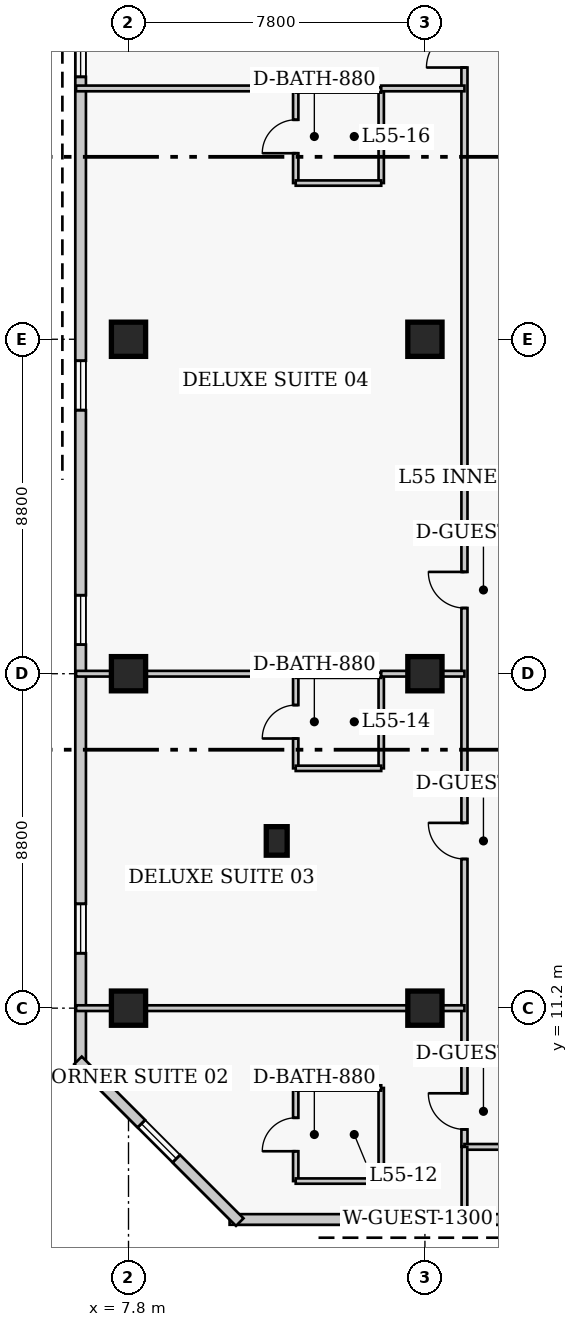
"""IFC4 building model, lengths in metres.
Left out: names, types, materials, properties, quantities, classifications, styles, units other than length and angle.
Written with IfcOpenShell. Run it as: python <this file> out.ifc"""

import sys

from ifc_helpers import new_model, si_unit, direction, frame, frame_2d, origin, origin_2d, place, context, subcontext, project, spatial, rectangle, extrude, element, fill, save


model = new_model("IFC4")
c1 = context("Model", 3, precision=1e-05, world=origin(), true_north=direction((0.0, 1.0)))
c2 = subcontext(c1, "Body", "Model", "MODEL_VIEW")
j1 = project(units=[si_unit("LENGTHUNIT", "METRE"), si_unit("PLANEANGLEUNIT", "RADIAN")], contexts=[c1])
p1 = place(None, origin())
s1 = spatial("IfcSite", under=j1, at=p1, CompositionType="ELEMENT")
p2 = place(p1, origin())
s2 = spatial("IfcBuilding", under=s1, at=p2, CompositionType="ELEMENT")
p3 = place(p2, frame((0.0, 0.0, 220.2)))
s3 = spatial("IfcBuildingStorey", under=s2, at=p3, CompositionType="ELEMENT", Elevation=220.2)
for number, where, z_axis, x_axis in (
    (1, (7.8, 11.2, 0.0), (0.0, 0.0, 1.0), (1.0, 0.0, 0.0)),
    (2, (7.8, 20.0, 0.0), (0.0, 0.0, 1.0), (1.0, 0.0, 0.0)),
    (3, (7.8, 28.8, 0.0), (0.0, 0.0, 1.0), (1.0, 0.0, 0.0)),
    (4, (15.6, 11.2, 0.0), (0.0, 0.0, 1.0), (1.0, 0.0, 0.0)),
    (5, (15.6, 20.0, 0.0), (0.0, 0.0, 1.0), (1.0, 0.0, 0.0)),
    (6, (15.6, 28.8, 0.0), (0.0, 0.0, 1.0), (1.0, 0.0, 0.0)),
):
    element("IfcColumn", number, at=place(p3, frame(where, z_axis=z_axis, x_axis=x_axis)), inside=s3, PredefinedType="COLUMN", context=c2, shape_type="SweptSolid", body=[
        extrude(rectangle(XDim=0.9, YDim=0.9, at=origin_2d()), origin(), (0.0, 0.0, 1.0), 3.9),
    ])
p4 = place(p3, frame((11.7, 15.6, 0.0), z_axis=(0.0, 0.0, 1.0), x_axis=(1.0, 0.0, 0.0)))
e7 = element("IfcColumn", 7, at=p4, inside=s3, PredefinedType="PILASTER", context=c2, shape_type="SweptSolid", body=[
    extrude(rectangle(XDim=0.55, YDim=0.75, at=origin_2d()), origin(), (0.0, 0.0, 1.0), 3.9),
])
p5 = place(p3, frame((10.46, 5.64, 0.0), z_axis=(0.0, 0.0, 1.0), x_axis=(1.0, 0.0, 0.0)))
e8 = element("IfcWall", 8, at=p5, inside=s3, PredefinedType="SOLIDWALL", context=c2, shape_type="SweptSolid", body=[
    extrude(rectangle(XDim=25.83, YDim=0.28, at=frame_2d((12.915, 0.0))), origin(), (0.0, 0.0, 1.0), 3.65),
])
p6 = place(p5, frame((4.305, 0.0, 0.85)))
e9 = element("IfcOpeningElement", 9, at=p6, cuts=e8, PredefinedType="OPENING", context=c2, shape_type="SweptSolid", body=[
    extrude(rectangle(XDim=1.3, YDim=1.7, at=frame_2d((0.65, 0.85))), frame((0.0, 0.15, 0.0), z_axis=(0.0, -1.0, 0.0), x_axis=(1.0, 0.0, 0.0)), (0.0, 0.0, 1.0), 0.3),
])
p7 = place(p5, frame((11.615, 0.0, 0.85)))
e10 = element("IfcOpeningElement", 10, at=p7, cuts=e8, PredefinedType="OPENING", context=c2, shape_type="SweptSolid", body=[
    extrude(rectangle(XDim=1.3, YDim=1.7, at=frame_2d((0.65, 0.85))), frame((0.0, 0.15, 0.0), z_axis=(0.0, -1.0, 0.0), x_axis=(1.0, 0.0, 0.0)), (0.0, 0.0, 1.0), 0.3),
])
p8 = place(p5, frame((20.875, 0.0, 0.85)))
e11 = element("IfcOpeningElement", 11, at=p8, cuts=e8, PredefinedType="OPENING", context=c2, shape_type="SweptSolid", body=[
    extrude(rectangle(XDim=1.3, YDim=1.7, at=frame_2d((0.65, 0.85))), frame((0.0, 0.15, 0.0), z_axis=(0.0, -1.0, 0.0), x_axis=(1.0, 0.0, 0.0)), (0.0, 0.0, 1.0), 0.3),
])
p9 = place(p3, frame((6.54, 39.44, 0.0), z_axis=(0.0, 0.0, 1.0), x_axis=(0.0, -1.0, 0.0)))
e12 = element("IfcWall", 12, at=p9, inside=s3, PredefinedType="SOLIDWALL", context=c2, shape_type="SweptSolid", body=[
    extrude(rectangle(XDim=29.88, YDim=0.28, at=frame_2d((14.94, 0.0))), origin(), (0.0, 0.0, 1.0), 3.65),
])
p10 = place(p9, frame((2.435, 0.0, 0.85)))
e13 = element("IfcOpeningElement", 13, at=p10, cuts=e12, PredefinedType="OPENING", context=c2, shape_type="SweptSolid", body=[
    extrude(rectangle(XDim=1.3, YDim=1.7, at=frame_2d((0.65, 0.85))), frame((0.0, 0.15, 0.0), z_axis=(0.0, -1.0, 0.0), x_axis=(1.0, 0.0, 0.0)), (0.0, 0.0, 1.0), 0.3),
])
p11 = place(p9, frame((11.205, 0.0, 0.85)))
e14 = element("IfcOpeningElement", 14, at=p11, cuts=e12, PredefinedType="OPENING", context=c2, shape_type="SweptSolid", body=[
    extrude(rectangle(XDim=1.3, YDim=1.7, at=frame_2d((0.65, 0.85))), frame((0.0, 0.15, 0.0), z_axis=(0.0, -1.0, 0.0), x_axis=(1.0, 0.0, 0.0)), (0.0, 0.0, 1.0), 0.3),
])
p12 = place(p9, frame((17.375, 0.0, 0.85)))
e15 = element("IfcOpeningElement", 15, at=p12, cuts=e12, PredefinedType="OPENING", context=c2, shape_type="SweptSolid", body=[
    extrude(rectangle(XDim=1.3, YDim=1.7, at=frame_2d((0.65, 0.85))), frame((0.0, 0.15, 0.0), z_axis=(0.0, -1.0, 0.0), x_axis=(1.0, 0.0, 0.0)), (0.0, 0.0, 1.0), 0.3),
])
p13 = place(p9, frame((25.495, 0.0, 0.85)))
e16 = element("IfcOpeningElement", 16, at=p13, cuts=e12, PredefinedType="OPENING", context=c2, shape_type="SweptSolid", body=[
    extrude(rectangle(XDim=1.3, YDim=1.7, at=frame_2d((0.65, 0.85))), frame((0.0, 0.15, 0.0), z_axis=(0.0, -1.0, 0.0), x_axis=(1.0, 0.0, 0.0)), (0.0, 0.0, 1.0), 0.3),
])
p14 = place(p3, frame((6.471, 9.827, 0.0), z_axis=(0.0, 0.0, 1.0), x_axis=(0.707106781187, -0.707106781187, 0.0)))
e17 = element("IfcWall", 17, at=p14, inside=s3, PredefinedType="SOLIDWALL", context=c2, shape_type="SweptSolid", body=[
    extrude(rectangle(XDim=6.02, YDim=0.28, at=frame_2d((3.01, 0.0))), origin(), (0.0, 0.0, 1.0), 3.65),
])
p15 = place(p14, frame((2.36, 0.0, 0.85)))
e18 = element("IfcOpeningElement", 18, at=p15, cuts=e17, PredefinedType="OPENING", context=c2, shape_type="SweptSolid", body=[
    extrude(rectangle(XDim=1.3, YDim=1.7, at=frame_2d((0.65, 0.85))), frame((0.0, 0.15, 0.0), z_axis=(0.0, -1.0, 0.0), x_axis=(1.0, 0.0, 0.0)), (0.0, 0.0, 1.0), 0.3),
])
p16 = place(p3, frame((16.64, 7.55, 0.0), z_axis=(0.0, 0.0, 1.0), x_axis=(0.0, 1.0, 0.0)))
e19 = element("IfcWall", 19, at=p16, inside=s3, PredefinedType="PARTITIONING", context=c2, shape_type="SweptSolid", body=[
    extrude(rectangle(XDim=33.1, YDim=0.16, at=frame_2d((16.55, 0.0))), origin(), (0.0, 0.0, 1.0), 3.65),
])
p17 = place(p16, frame((0.46, 0.0, 0.0)))
e20 = element("IfcOpeningElement", 20, at=p17, cuts=e19, PredefinedType="OPENING", context=c2, shape_type="SweptSolid", body=[
    extrude(rectangle(XDim=0.95, YDim=2.1, at=frame_2d((0.475, 1.05))), frame((0.0, 0.09, 0.0), z_axis=(0.0, -1.0, 0.0), x_axis=(1.0, 0.0, 0.0)), (0.0, 0.0, 1.0), 0.18),
])
p18 = place(p16, frame((7.575, 0.0, 0.0)))
e21 = element("IfcOpeningElement", 21, at=p18, cuts=e19, PredefinedType="OPENING", context=c2, shape_type="SweptSolid", body=[
    extrude(rectangle(XDim=0.95, YDim=2.1, at=frame_2d((0.475, 1.05))), frame((0.0, 0.09, 0.0), z_axis=(0.0, -1.0, 0.0), x_axis=(1.0, 0.0, 0.0)), (0.0, 0.0, 1.0), 0.18),
])
p19 = place(p16, frame((14.178, 0.0, 0.0)))
e22 = element("IfcOpeningElement", 22, at=p19, cuts=e19, PredefinedType="OPENING", context=c2, shape_type="SweptSolid", body=[
    extrude(rectangle(XDim=0.95, YDim=2.1, at=frame_2d((0.475, 1.05))), frame((0.0, 0.09, 0.0), z_axis=(0.0, -1.0, 0.0), x_axis=(1.0, 0.0, 0.0)), (0.0, 0.0, 1.0), 0.18),
])
p20 = place(p16, frame((28.4, 0.0, 0.0)))
e23 = element("IfcOpeningElement", 23, at=p20, cuts=e19, PredefinedType="OPENING", context=c2, shape_type="SweptSolid", body=[
    extrude(rectangle(XDim=1.0, YDim=2.15, at=frame_2d((0.5, 1.075))), frame((0.0, 0.09, 0.0), z_axis=(0.0, -1.0, 0.0), x_axis=(1.0, 0.0, 0.0)), (0.0, 0.0, 1.0), 0.18),
])
p21 = place(p3, frame((16.64, 7.55, 0.0), z_axis=(0.0, 0.0, 1.0), x_axis=(1.0, 0.0, 0.0)))
e24 = element("IfcWall", 24, at=p21, inside=s3, PredefinedType="PARTITIONING", context=c2, shape_type="SweptSolid", body=[
    extrude(rectangle(XDim=2.22, YDim=0.15, at=frame_2d((1.11, 0.0))), origin(), (0.0, 0.0, 1.0), 3.65),
])
p22 = place(p3, frame((16.64, 5.52, 0.0), z_axis=(0.0, 0.0, 1.0), x_axis=(0.0, 1.0, 0.0)))
e25 = element("IfcWall", 25, at=p22, inside=s3, PredefinedType="PARTITIONING", context=c2, shape_type="SweptSolid", body=[
    extrude(rectangle(XDim=2.03, YDim=0.15, at=frame_2d((1.015, 0.0))), origin(), (0.0, 0.0, 1.0), 3.65),
])
p23 = place(p3, frame((12.2, 6.65, 0.0), z_axis=(0.0, 0.0, 1.0), x_axis=(0.0, 1.0, 0.0)))
e26 = element("IfcWall", 26, at=p23, inside=s3, PredefinedType="PLUMBINGWALL", context=c2, shape_type="SweptSolid", body=[
    extrude(rectangle(XDim=2.45, YDim=0.14, at=frame_2d((1.225, 0.0))), origin(), (0.0, 0.0, 1.0), 3.65),
])
p24 = place(p23, frame((0.785, 0.0, 0.0)))
e27 = element("IfcOpeningElement", 27, at=p24, cuts=e26, PredefinedType="OPENING", context=c2, shape_type="SweptSolid", body=[
    extrude(rectangle(XDim=0.88, YDim=2.05, at=frame_2d((0.44, 1.025))), frame((0.0, 0.08, 0.0), z_axis=(0.0, -1.0, 0.0), x_axis=(1.0, 0.0, 0.0)), (0.0, 0.0, 1.0), 0.16),
])
p25 = place(p3, frame((14.45, 6.65, 0.0), z_axis=(0.0, 0.0, 1.0), x_axis=(0.0, 1.0, 0.0)))
e28 = element("IfcWall", 28, at=p25, inside=s3, PredefinedType="PLUMBINGWALL", context=c2, shape_type="SweptSolid", body=[
    extrude(rectangle(XDim=2.45, YDim=0.14, at=frame_2d((1.225, 0.0))), origin(), (0.0, 0.0, 1.0), 3.65),
])
for number, where, z_axis, x_axis in (
    (29, (12.2, 6.65, 0.0), (0.0, 0.0, 1.0), (1.0, 0.0, 0.0)),
    (30, (12.2, 9.1, 0.0), (0.0, 0.0, 1.0), (1.0, 0.0, 0.0)),
):
    element("IfcWall", number, at=place(p3, frame(where, z_axis=z_axis, x_axis=x_axis)), inside=s3, PredefinedType="PLUMBINGWALL", context=c2, shape_type="SweptSolid", body=[
        extrude(rectangle(XDim=2.25, YDim=0.14, at=frame_2d((1.125, 0.0))), origin(), (0.0, 0.0, 1.0), 3.65),
    ])
p26 = place(p3, frame((6.42, 11.2, 0.0), z_axis=(0.0, 0.0, 1.0), x_axis=(1.0, 0.0, 0.0)))
e31 = element("IfcWall", 31, at=p26, inside=s3, PredefinedType="PARTITIONING", context=c2, shape_type="SweptSolid", body=[
    extrude(rectangle(XDim=10.22, YDim=0.15, at=frame_2d((5.11, 0.0))), origin(), (0.0, 0.0, 1.0), 2.878),
])
p27 = place(p3, frame((12.2, 17.51, 0.0), z_axis=(0.0, 0.0, 1.0), x_axis=(0.0, 1.0, 0.0)))
e32 = element("IfcWall", 32, at=p27, inside=s3, PredefinedType="PLUMBINGWALL", context=c2, shape_type="SweptSolid", body=[
    extrude(rectangle(XDim=2.45, YDim=0.14, at=frame_2d((1.225, 0.0))), origin(), (0.0, 0.0, 1.0), 3.65),
])
p28 = place(p27, frame((0.785, 0.0, 0.0)))
e33 = element("IfcOpeningElement", 33, at=p28, cuts=e32, PredefinedType="OPENING", context=c2, shape_type="SweptSolid", body=[
    extrude(rectangle(XDim=0.88, YDim=2.05, at=frame_2d((0.44, 1.025))), frame((0.0, 0.08, 0.0), z_axis=(0.0, -1.0, 0.0), x_axis=(1.0, 0.0, 0.0)), (0.0, 0.0, 1.0), 0.16),
])
p29 = place(p3, frame((14.45, 17.51, 0.0), z_axis=(0.0, 0.0, 1.0), x_axis=(0.0, 1.0, 0.0)))
e34 = element("IfcWall", 34, at=p29, inside=s3, PredefinedType="PLUMBINGWALL", context=c2, shape_type="SweptSolid", body=[
    extrude(rectangle(XDim=2.45, YDim=0.14, at=frame_2d((1.225, 0.0))), origin(), (0.0, 0.0, 1.0), 3.65),
])
p30 = place(p3, frame((12.2, 17.51, 0.0), z_axis=(0.0, 0.0, 1.0), x_axis=(1.0, 0.0, 0.0)))
e35 = element("IfcWall", 35, at=p30, inside=s3, PredefinedType="PLUMBINGWALL", context=c2, shape_type="SweptSolid", body=[
    extrude(rectangle(XDim=2.25, YDim=0.14, at=frame_2d((1.125, 0.0))), origin(), (0.0, 0.0, 1.0), 3.65),
])
p31 = place(p3, frame((12.2, 19.96, 0.0), z_axis=(0.0, 0.0, 1.0), x_axis=(1.0, 0.0, 0.0)))
e36 = element("IfcWall", 36, at=p31, inside=s3, PredefinedType="PLUMBINGWALL", context=c2, shape_type="SweptSolid", body=[
    extrude(rectangle(XDim=2.25, YDim=0.14, at=frame_2d((1.125, 0.0))), origin(), (0.0, 0.0, 1.0), 3.038),
])
p32 = place(p3, frame((6.42, 20.0, 0.0), z_axis=(0.0, 0.0, 1.0), x_axis=(1.0, 0.0, 0.0)))
e37 = element("IfcWall", 37, at=p32, inside=s3, PredefinedType="PARTITIONING", context=c2, shape_type="SweptSolid", body=[
    extrude(rectangle(XDim=5.78, YDim=0.15, at=frame_2d((2.89, 0.0))), origin(), (0.0, 0.0, 1.0), 2.878),
])
p33 = place(p3, frame((14.45, 20.0, 0.0), z_axis=(0.0, 0.0, 1.0), x_axis=(1.0, 0.0, 0.0)))
e38 = element("IfcWall", 38, at=p33, inside=s3, PredefinedType="PARTITIONING", context=c2, shape_type="SweptSolid", body=[
    extrude(rectangle(XDim=2.19, YDim=0.15, at=frame_2d((1.095, 0.0))), origin(), (0.0, 0.0, 1.0), 2.878),
])
p34 = place(p3, frame((12.2, 32.91, 0.0), z_axis=(0.0, 0.0, 1.0), x_axis=(0.0, 1.0, 0.0)))
e39 = element("IfcWall", 39, at=p34, inside=s3, PredefinedType="PLUMBINGWALL", context=c2, shape_type="SweptSolid", body=[
    extrude(rectangle(XDim=2.45, YDim=0.14, at=frame_2d((1.225, 0.0))), origin(), (0.0, 0.0, 1.0), 3.65),
])
p35 = place(p34, frame((0.785, 0.0, 0.0)))
e40 = element("IfcOpeningElement", 40, at=p35, cuts=e39, PredefinedType="OPENING", context=c2, shape_type="SweptSolid", body=[
    extrude(rectangle(XDim=0.88, YDim=2.05, at=frame_2d((0.44, 1.025))), frame((0.0, 0.08, 0.0), z_axis=(0.0, -1.0, 0.0), x_axis=(1.0, 0.0, 0.0)), (0.0, 0.0, 1.0), 0.16),
])
p36 = place(p3, frame((14.45, 32.91, 0.0), z_axis=(0.0, 0.0, 1.0), x_axis=(0.0, 1.0, 0.0)))
e41 = element("IfcWall", 41, at=p36, inside=s3, PredefinedType="PLUMBINGWALL", context=c2, shape_type="SweptSolid", body=[
    extrude(rectangle(XDim=2.45, YDim=0.14, at=frame_2d((1.225, 0.0))), origin(), (0.0, 0.0, 1.0), 3.65),
])
for number, where, z_axis, x_axis in (
    (42, (12.2, 32.91, 0.0), (0.0, 0.0, 1.0), (1.0, 0.0, 0.0)),
    (43, (12.2, 35.36, 0.0), (0.0, 0.0, 1.0), (1.0, 0.0, 0.0)),
):
    element("IfcWall", number, at=place(p3, frame(where, z_axis=z_axis, x_axis=x_axis)), inside=s3, PredefinedType="PLUMBINGWALL", context=c2, shape_type="SweptSolid", body=[
        extrude(rectangle(XDim=2.25, YDim=0.14, at=frame_2d((1.125, 0.0))), origin(), (0.0, 0.0, 1.0), 3.65),
    ])
p37 = place(p3, frame((6.42, 35.4, 0.0), z_axis=(0.0, 0.0, 1.0), x_axis=(1.0, 0.0, 0.0)))
e44 = element("IfcWall", 44, at=p37, inside=s3, PredefinedType="PARTITIONING", context=c2, shape_type="SweptSolid", body=[
    extrude(rectangle(XDim=5.78, YDim=0.15, at=frame_2d((2.89, 0.0))), origin(), (0.0, 0.0, 1.0), 3.65),
])
p38 = place(p3, frame((14.45, 35.4, 0.0), z_axis=(0.0, 0.0, 1.0), x_axis=(1.0, 0.0, 0.0)))
e45 = element("IfcWall", 45, at=p38, inside=s3, PredefinedType="PARTITIONING", context=c2, shape_type="SweptSolid", body=[
    extrude(rectangle(XDim=2.19, YDim=0.15, at=frame_2d((1.095, 0.0))), origin(), (0.0, 0.0, 1.0), 3.65),
])
p39 = place(p6, origin())
e46 = element("IfcWindow", 46, at=p39, inside=s3, PartitioningType="SINGLE_PANEL", PredefinedType="WINDOW", context=c2, shape_type="SweptSolid", body=[
    extrude(rectangle(XDim=1.3, YDim=1.7, at=frame_2d((0.65, 0.85))), frame((0.0, 0.03, 0.0), z_axis=(0.0, -1.0, 0.0), x_axis=(1.0, 0.0, 0.0)), (0.0, 0.0, 1.0), 0.06),
])
fill(e9, e46)
p40 = place(p10, origin())
e47 = element("IfcWindow", 47, at=p40, inside=s3, PartitioningType="SINGLE_PANEL", PredefinedType="WINDOW", context=c2, shape_type="SweptSolid", body=[
    extrude(rectangle(XDim=1.3, YDim=1.7, at=frame_2d((0.65, 0.85))), frame((0.0, 0.03, 0.0), z_axis=(0.0, -1.0, 0.0), x_axis=(1.0, 0.0, 0.0)), (0.0, 0.0, 1.0), 0.06),
])
fill(e13, e47)
p41 = place(p11, origin())
e48 = element("IfcWindow", 48, at=p41, inside=s3, PartitioningType="SINGLE_PANEL", PredefinedType="WINDOW", context=c2, shape_type="SweptSolid", body=[
    extrude(rectangle(XDim=1.3, YDim=1.7, at=frame_2d((0.65, 0.85))), frame((0.0, 0.03, 0.0), z_axis=(0.0, -1.0, 0.0), x_axis=(1.0, 0.0, 0.0)), (0.0, 0.0, 1.0), 0.06),
])
fill(e14, e48)
p42 = place(p12, origin())
e49 = element("IfcWindow", 49, at=p42, inside=s3, PartitioningType="SINGLE_PANEL", PredefinedType="WINDOW", context=c2, shape_type="SweptSolid", body=[
    extrude(rectangle(XDim=1.3, YDim=1.7, at=frame_2d((0.65, 0.85))), frame((0.0, 0.03, 0.0), z_axis=(0.0, -1.0, 0.0), x_axis=(1.0, 0.0, 0.0)), (0.0, 0.0, 1.0), 0.06),
])
fill(e15, e49)
p43 = place(p13, origin())
e50 = element("IfcWindow", 50, at=p43, inside=s3, PartitioningType="SINGLE_PANEL", PredefinedType="WINDOW", context=c2, shape_type="SweptSolid", body=[
    extrude(rectangle(XDim=1.3, YDim=1.7, at=frame_2d((0.65, 0.85))), frame((0.0, 0.03, 0.0), z_axis=(0.0, -1.0, 0.0), x_axis=(1.0, 0.0, 0.0)), (0.0, 0.0, 1.0), 0.06),
])
fill(e16, e50)
p44 = place(p15, origin())
e51 = element("IfcWindow", 51, at=p44, inside=s3, PartitioningType="SINGLE_PANEL", PredefinedType="WINDOW", context=c2, shape_type="SweptSolid", body=[
    extrude(rectangle(XDim=1.3, YDim=1.7, at=frame_2d((0.65, 0.85))), frame((0.0, 0.03, 0.0), z_axis=(0.0, -1.0, 0.0), x_axis=(1.0, 0.0, 0.0)), (0.0, 0.0, 1.0), 0.06),
])
fill(e18, e51)
p45 = place(p24, origin())
e52 = element("IfcDoor", 52, at=p45, inside=s3, OperationType="SINGLE_SWING_LEFT", PredefinedType="DOOR", context=c2, shape_type="SweptSolid", body=[
    extrude(rectangle(XDim=0.88, YDim=2.05, at=frame_2d((0.44, 1.025))), frame((0.0, 0.025, 0.0), z_axis=(0.0, -1.0, 0.0), x_axis=(1.0, 0.0, 0.0)), (0.0, 0.0, 1.0), 0.05),
])
fill(e27, e52)
p46 = place(p17, origin())
e53 = element("IfcDoor", 53, at=p46, inside=s3, OperationType="SINGLE_SWING_RIGHT", PredefinedType="DOOR", context=c2, shape_type="SweptSolid", body=[
    extrude(rectangle(XDim=0.95, YDim=2.1, at=frame_2d((0.475, 1.05))), frame((0.0, 0.025, 0.0), z_axis=(0.0, -1.0, 0.0), x_axis=(1.0, 0.0, 0.0)), (0.0, 0.0, 1.0), 0.05),
])
fill(e20, e53)
p47 = place(p28, origin())
e54 = element("IfcDoor", 54, at=p47, inside=s3, OperationType="SINGLE_SWING_LEFT", PredefinedType="DOOR", context=c2, shape_type="SweptSolid", body=[
    extrude(rectangle(XDim=0.88, YDim=2.05, at=frame_2d((0.44, 1.025))), frame((0.0, 0.025, 0.0), z_axis=(0.0, -1.0, 0.0), x_axis=(1.0, 0.0, 0.0)), (0.0, 0.0, 1.0), 0.05),
])
fill(e33, e54)
p48 = place(p18, origin())
e55 = element("IfcDoor", 55, at=p48, inside=s3, OperationType="SINGLE_SWING_RIGHT", PredefinedType="DOOR", context=c2, shape_type="SweptSolid", body=[
    extrude(rectangle(XDim=0.95, YDim=2.1, at=frame_2d((0.475, 1.05))), frame((0.0, 0.025, 0.0), z_axis=(0.0, -1.0, 0.0), x_axis=(1.0, 0.0, 0.0)), (0.0, 0.0, 1.0), 0.05),
])
fill(e21, e55)
p49 = place(p35, origin())
e56 = element("IfcDoor", 56, at=p49, inside=s3, OperationType="SINGLE_SWING_LEFT", PredefinedType="DOOR", context=c2, shape_type="SweptSolid", body=[
    extrude(rectangle(XDim=0.88, YDim=2.05, at=frame_2d((0.44, 1.025))), frame((0.0, 0.025, 0.0), z_axis=(0.0, -1.0, 0.0), x_axis=(1.0, 0.0, 0.0)), (0.0, 0.0, 1.0), 0.05),
])
fill(e40, e56)
p50 = place(p19, origin())
e57 = element("IfcDoor", 57, at=p50, inside=s3, OperationType="SINGLE_SWING_RIGHT", PredefinedType="DOOR", context=c2, shape_type="SweptSolid", body=[
    extrude(rectangle(XDim=0.95, YDim=2.1, at=frame_2d((0.475, 1.05))), frame((0.0, 0.025, 0.0), z_axis=(0.0, -1.0, 0.0), x_axis=(1.0, 0.0, 0.0)), (0.0, 0.0, 1.0), 0.05),
])
fill(e22, e57)
p51 = place(p20, origin())
e58 = element("IfcDoor", 58, at=p51, inside=s3, OperationType="SINGLE_SWING_LEFT", PredefinedType="DOOR", context=c2, shape_type="SweptSolid", body=[
    extrude(rectangle(XDim=1.0, YDim=2.15, at=frame_2d((0.5, 1.075))), frame((0.0, 0.025, 0.0), z_axis=(0.0, -1.0, 0.0), x_axis=(1.0, 0.0, 0.0)), (0.0, 0.0, 1.0), 0.05),
])
fill(e23, e58)
save(model, sys.argv[1])
